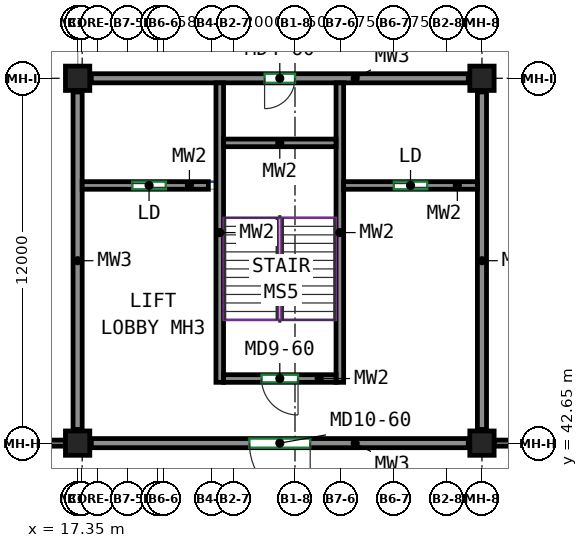
"""IFC4 building model, lengths in metres.
Left out: names, types, materials, properties, quantities, classifications, styles, units other than length and angle.
Written with IfcOpenShell. Run it as: python <this file> out.ifc"""

import sys

from ifc_helpers import new_model, si_unit, direction, frame, frame_2d, origin, origin_2d, place, context, subcontext, project, spatial, rectangle, extrude, source, transform, mapped, element, fill, save


model = new_model("IFC4")
c1 = context("Model", 3, precision=1e-05, world=origin(), true_north=direction((0.0, 1.0)))
c2 = subcontext(c1, "Body", "Model", "MODEL_VIEW")
j1 = project(units=[si_unit("LENGTHUNIT", "METRE"), si_unit("PLANEANGLEUNIT", "RADIAN")], contexts=[c1])
p1 = place(None, origin())
s1 = spatial("IfcSite", under=j1, at=p1, CompositionType="ELEMENT")
p2 = place(p1, origin())
s2 = spatial("IfcBuilding", under=s1, at=p2, CompositionType="ELEMENT")
p3 = place(p2, frame((0.0, 0.0, 9.0)))
s3 = spatial("IfcBuildingStorey", under=s2, at=p3, CompositionType="ELEMENT", Elevation=9.0)
m1 = source(origin(), c2, "Body", "SweptSolid", [
    extrude(rectangle(XDim=0.8, YDim=0.8, at=origin_2d()), origin(), (0.0, 0.0, 1.0), 4.1),
])
for number, where, z_axis, x_axis in (
    (1, (17.35, 42.65, 0.0), (0.0, 0.0, 1.0), (1.0, 0.0, 0.0)),
    (2, (17.35, 54.65, 0.0), (0.0, 0.0, 1.0), (1.0, 0.0, 0.0)),
    (3, (30.65, 42.65, 0.0), (0.0, 0.0, 1.0), (1.0, 0.0, 0.0)),
    (4, (30.65, 54.65, 0.0), (0.0, 0.0, 1.0), (1.0, 0.0, 0.0)),
):
    element("IfcColumn", number, at=place(p3, frame(where, z_axis=z_axis, x_axis=x_axis)), inside=s3, PredefinedType="COLUMN", context=c2, shape_type="MappedRepresentation", body=[
        mapped(m1, transform((0.0, 0.0, 0.0))),
    ])
m2 = source(origin(), c2, "Body", "SweptSolid", [
    extrude(rectangle(XDim=12.4, YDim=0.3, at=frame_2d((6.2, 0.0))), origin(), (0.0, 0.0, 1.0), 3.2),
])
p4 = place(p3, frame((30.2, 54.65, 0.0), z_axis=(0.0, 0.0, 1.0), x_axis=(-1.0, 0.0, 0.0)))
e5 = element("IfcWall", 5, at=p4, inside=s3, PredefinedType="SHEAR", context=c2, shape_type="MappedRepresentation", body=[
    mapped(m2, transform((0.0, 0.0, 0.0))),
])
p5 = place(p4, frame((5.7, 0.0, 0.0)))
e6 = element("IfcOpeningElement", 6, at=p5, cuts=e5, PredefinedType="OPENING", context=c2, shape_type="SweptSolid", body=[
    extrude(rectangle(XDim=1.0, YDim=2.1, at=frame_2d((0.5, 1.05))), frame((0.0, 0.16, 0.0), z_axis=(0.0, -1.0, 0.0), x_axis=(1.0, 0.0, 0.0)), (0.0, 0.0, 1.0), 0.32),
])
p6 = place(p3, frame((30.2, 42.65, 0.0), z_axis=(0.0, 0.0, 1.0), x_axis=(-1.0, 0.0, 0.0)))
e7 = element("IfcWall", 7, at=p6, inside=s3, PredefinedType="SHEAR", context=c2, shape_type="MappedRepresentation", body=[
    mapped(m2, transform((0.0, 0.0, 0.0))),
])
p7 = place(p6, frame((5.2, 0.0, 0.0)))
e8 = element("IfcOpeningElement", 8, at=p7, cuts=e7, PredefinedType="OPENING", context=c2, shape_type="SweptSolid", body=[
    extrude(rectangle(XDim=2.0, YDim=2.4, at=frame_2d((1.0, 1.2))), frame((0.0, 0.16, 0.0), z_axis=(0.0, -1.0, 0.0), x_axis=(1.0, 0.0, 0.0)), (0.0, 0.0, 1.0), 0.32),
])
m3 = source(origin(), c2, "Body", "SweptSolid", [
    extrude(rectangle(XDim=11.1, YDim=0.3, at=frame_2d((5.55, 0.0))), origin(), (0.0, 0.0, 1.0), 3.2),
])
for number, where, z_axis, x_axis in (
    (9, (30.65, 54.2, 0.0), (0.0, 0.0, 1.0), (0.0, -1.0, 0.0)),
    (10, (17.35, 54.2, 0.0), (0.0, 0.0, 1.0), (0.0, -1.0, 0.0)),
):
    element("IfcWall", number, at=place(p3, frame(where, z_axis=z_axis, x_axis=x_axis)), inside=s3, PredefinedType="SHEAR", context=c2, shape_type="MappedRepresentation", body=[
        mapped(m3, transform((0.0, 0.0, 0.0))),
    ])
m4 = source(origin(), c2, "Body", "SweptSolid", [
    extrude(rectangle(XDim=9.85, YDim=0.25, at=frame_2d((4.925, 0.0))), origin(), (0.0, 0.0, 1.0), 4.1),
])
for number, where, z_axis, x_axis in (
    (11, (25.975, 54.5, 0.0), (0.0, 0.0, 1.0), (0.0, -1.0, 0.0)),
    (12, (22.025, 54.5, 0.0), (0.0, 0.0, 1.0), (0.0, -1.0, 0.0)),
):
    element("IfcWall", number, at=place(p3, frame(where, z_axis=z_axis, x_axis=x_axis)), inside=s3, PredefinedType="SHEAR", context=c2, shape_type="MappedRepresentation", body=[
        mapped(m4, transform((0.0, 0.0, 0.0))),
    ])
m5 = source(origin(), c2, "Body", "SweptSolid", [
    extrude(rectangle(XDim=3.7, YDim=0.25, at=frame_2d((1.85, 0.0))), origin(), (0.0, 0.0, 1.0), 4.1),
])
p8 = place(p3, frame((25.85, 52.525, 0.0), z_axis=(0.0, 0.0, 1.0), x_axis=(-1.0, 0.0, 0.0)))
e13 = element("IfcWall", 13, at=p8, inside=s3, PredefinedType="SHEAR", context=c2, shape_type="MappedRepresentation", body=[
    mapped(m5, transform((0.0, 0.0, 0.0))),
])
p9 = place(p3, frame((25.85, 44.775, 0.0), z_axis=(0.0, 0.0, 1.0), x_axis=(-1.0, 0.0, 0.0)))
e14 = element("IfcWall", 14, at=p9, inside=s3, PredefinedType="SHEAR", context=c2, shape_type="MappedRepresentation", body=[
    mapped(m5, transform((0.0, 0.0, 0.0))),
])
p10 = place(p9, frame((1.25, 0.0, 0.0)))
e15 = element("IfcOpeningElement", 15, at=p10, cuts=e14, PredefinedType="OPENING", context=c2, shape_type="SweptSolid", body=[
    extrude(rectangle(XDim=1.2, YDim=2.1, at=frame_2d((0.6, 1.05))), frame((0.0, 0.135, 0.0), z_axis=(0.0, -1.0, 0.0), x_axis=(1.0, 0.0, 0.0)), (0.0, 0.0, 1.0), 0.27),
])
m6 = source(origin(), c2, "Body", "SweptSolid", [
    extrude(rectangle(XDim=4.4, YDim=0.25, at=frame_2d((2.2, 0.0))), origin(), (0.0, 0.0, 1.0), 4.1),
])
p11 = place(p3, frame((30.5, 51.125, 0.0), z_axis=(0.0, 0.0, 1.0), x_axis=(-1.0, 0.0, 0.0)))
e16 = element("IfcWall", 16, at=p11, inside=s3, PredefinedType="SHEAR", context=c2, shape_type="MappedRepresentation", body=[
    mapped(m6, transform((0.0, 0.0, 0.0))),
])
p12 = place(p11, frame((1.65, 0.0, 0.0)))
e17 = element("IfcOpeningElement", 17, at=p12, cuts=e16, PredefinedType="OPENING", context=c2, shape_type="SweptSolid", body=[
    extrude(rectangle(XDim=1.1, YDim=2.1, at=frame_2d((0.55, 1.05))), frame((0.0, 0.135, 0.0), z_axis=(0.0, -1.0, 0.0), x_axis=(1.0, 0.0, 0.0)), (0.0, 0.0, 1.0), 0.27),
])
m7 = source(origin(), c2, "Body", "SweptSolid", [
    extrude(rectangle(XDim=4.15, YDim=0.25, at=frame_2d((2.075, 0.0))), origin(), (0.0, 0.0, 1.0), 4.1),
])
p13 = place(p3, frame((21.65, 51.125, 0.0), z_axis=(0.0, 0.0, 1.0), x_axis=(-1.0, 0.0, 0.0)))
e18 = element("IfcWall", 18, at=p13, inside=s3, PredefinedType="SHEAR", context=c2, shape_type="MappedRepresentation", body=[
    mapped(m7, transform((0.0, 0.0, 0.0))),
])
p14 = place(p13, frame((1.4, 0.0, 0.0)))
e19 = element("IfcOpeningElement", 19, at=p14, cuts=e18, PredefinedType="OPENING", context=c2, shape_type="SweptSolid", body=[
    extrude(rectangle(XDim=1.1, YDim=2.1, at=frame_2d((0.55, 1.05))), frame((0.0, 0.135, 0.0), z_axis=(0.0, -1.0, 0.0), x_axis=(1.0, 0.0, 0.0)), (0.0, 0.0, 1.0), 0.27),
])
m8 = source(origin(), c2, "Body", "SweptSolid", [
    extrude(rectangle(XDim=11.2, YDim=0.2, at=frame_2d((5.6, 0.0))), origin(), (0.0, 0.0, 1.0), 3.2),
])
p15 = place(p3, frame((5.75, 42.65, 0.0), z_axis=(0.0, 0.0, 1.0), x_axis=(1.0, 0.0, 0.0)))
e20 = element("IfcWall", 20, at=p15, inside=s3, PredefinedType="PARTITIONING", context=c2, shape_type="MappedRepresentation", body=[
    mapped(m8, transform((0.0, 0.0, 0.0))),
])
p16 = place(p15, frame((4.4, 0.0, 0.0)))
e21 = element("IfcOpeningElement", 21, at=p16, cuts=e20, PredefinedType="OPENING", context=c2, shape_type="SweptSolid", body=[
    extrude(rectangle(XDim=2.4, YDim=2.4, at=frame_2d((1.2, 1.2))), frame((0.0, 0.11, 0.0), z_axis=(0.0, -1.0, 0.0), x_axis=(1.0, 0.0, 0.0)), (0.0, 0.0, 1.0), 0.22),
])
m9 = source(origin(), c2, "Body", "SweptSolid", [
    extrude(rectangle(XDim=1.8, YDim=0.2, at=frame_2d((0.9, 0.0))), origin(), (0.0, 0.0, 1.0), 4.1),
])
p17 = place(p3, frame((17.35, 56.85, 0.0), z_axis=(0.0, 0.0, 1.0), x_axis=(0.0, -1.0, 0.0)))
e22 = element("IfcWall", 22, at=p17, inside=s3, PredefinedType="PARTITIONING", context=c2, shape_type="MappedRepresentation", body=[
    mapped(m9, transform((0.0, 0.0, 0.0))),
])
p18 = place(p3, frame((31.05, 42.65, 0.0), z_axis=(0.0, 0.0, 1.0), x_axis=(1.0, 0.0, 0.0)))
e23 = element("IfcWall", 23, at=p18, inside=s3, PredefinedType="PARTITIONING", context=c2, shape_type="MappedRepresentation", body=[
    mapped(m8, transform((0.0, 0.0, 0.0))),
])
p19 = place(p18, frame((5.1, 0.0, 0.0)))
e24 = element("IfcOpeningElement", 24, at=p19, cuts=e23, PredefinedType="OPENING", context=c2, shape_type="SweptSolid", body=[
    extrude(rectangle(XDim=1.0, YDim=2.1, at=frame_2d((0.5, 1.05))), frame((0.0, 0.11, 0.0), z_axis=(0.0, -1.0, 0.0), x_axis=(1.0, 0.0, 0.0)), (0.0, 0.0, 1.0), 0.22),
])
p20 = place(p10, origin())
e25 = element("IfcDoor", 25, at=p20, inside=s3, OperationType="DOUBLE_DOOR_SINGLE_SWING", PredefinedType="DOOR", context=c2, shape_type="SweptSolid", body=[
    extrude(rectangle(XDim=1.2, YDim=2.1, at=frame_2d((0.6, 1.05))), frame((0.0, 0.025, 0.0), z_axis=(0.0, -1.0, 0.0), x_axis=(1.0, 0.0, 0.0)), (0.0, 0.0, 1.0), 0.05),
])
fill(e15, e25)
p21 = place(p7, origin())
e26 = element("IfcDoor", 26, at=p21, inside=s3, OperationType="DOUBLE_DOOR_SINGLE_SWING", PredefinedType="DOOR", context=c2, shape_type="SweptSolid", body=[
    extrude(rectangle(XDim=2.0, YDim=2.4, at=frame_2d((1.0, 1.2))), frame((0.0, 0.025, 0.0), z_axis=(0.0, -1.0, 0.0), x_axis=(1.0, 0.0, 0.0)), (0.0, 0.0, 1.0), 0.05),
])
fill(e8, e26)
p22 = place(p12, origin())
e27 = element("IfcDoor", 27, at=p22, inside=s3, OperationType="SLIDING_TO_LEFT", PredefinedType="DOOR", context=c2, shape_type="SweptSolid", body=[
    extrude(rectangle(XDim=1.1, YDim=2.1, at=frame_2d((0.55, 1.05))), frame((0.0, 0.025, 0.0), z_axis=(0.0, -1.0, 0.0), x_axis=(1.0, 0.0, 0.0)), (0.0, 0.0, 1.0), 0.05),
])
fill(e17, e27)
p23 = place(p14, origin())
e28 = element("IfcDoor", 28, at=p23, inside=s3, OperationType="SLIDING_TO_LEFT", PredefinedType="DOOR", context=c2, shape_type="SweptSolid", body=[
    extrude(rectangle(XDim=1.1, YDim=2.1, at=frame_2d((0.55, 1.05))), frame((0.0, 0.025, 0.0), z_axis=(0.0, -1.0, 0.0), x_axis=(1.0, 0.0, 0.0)), (0.0, 0.0, 1.0), 0.05),
])
fill(e19, e28)
p24 = place(p5, origin())
e29 = element("IfcDoor", 29, at=p24, inside=s3, OperationType="SINGLE_SWING_RIGHT", PredefinedType="DOOR", context=c2, shape_type="SweptSolid", body=[
    extrude(rectangle(XDim=1.0, YDim=2.1, at=frame_2d((0.5, 1.05))), frame((0.0, 0.025, 0.0), z_axis=(0.0, -1.0, 0.0), x_axis=(1.0, 0.0, 0.0)), (0.0, 0.0, 1.0), 0.05),
])
fill(e6, e29)
save(model, sys.argv[1])
